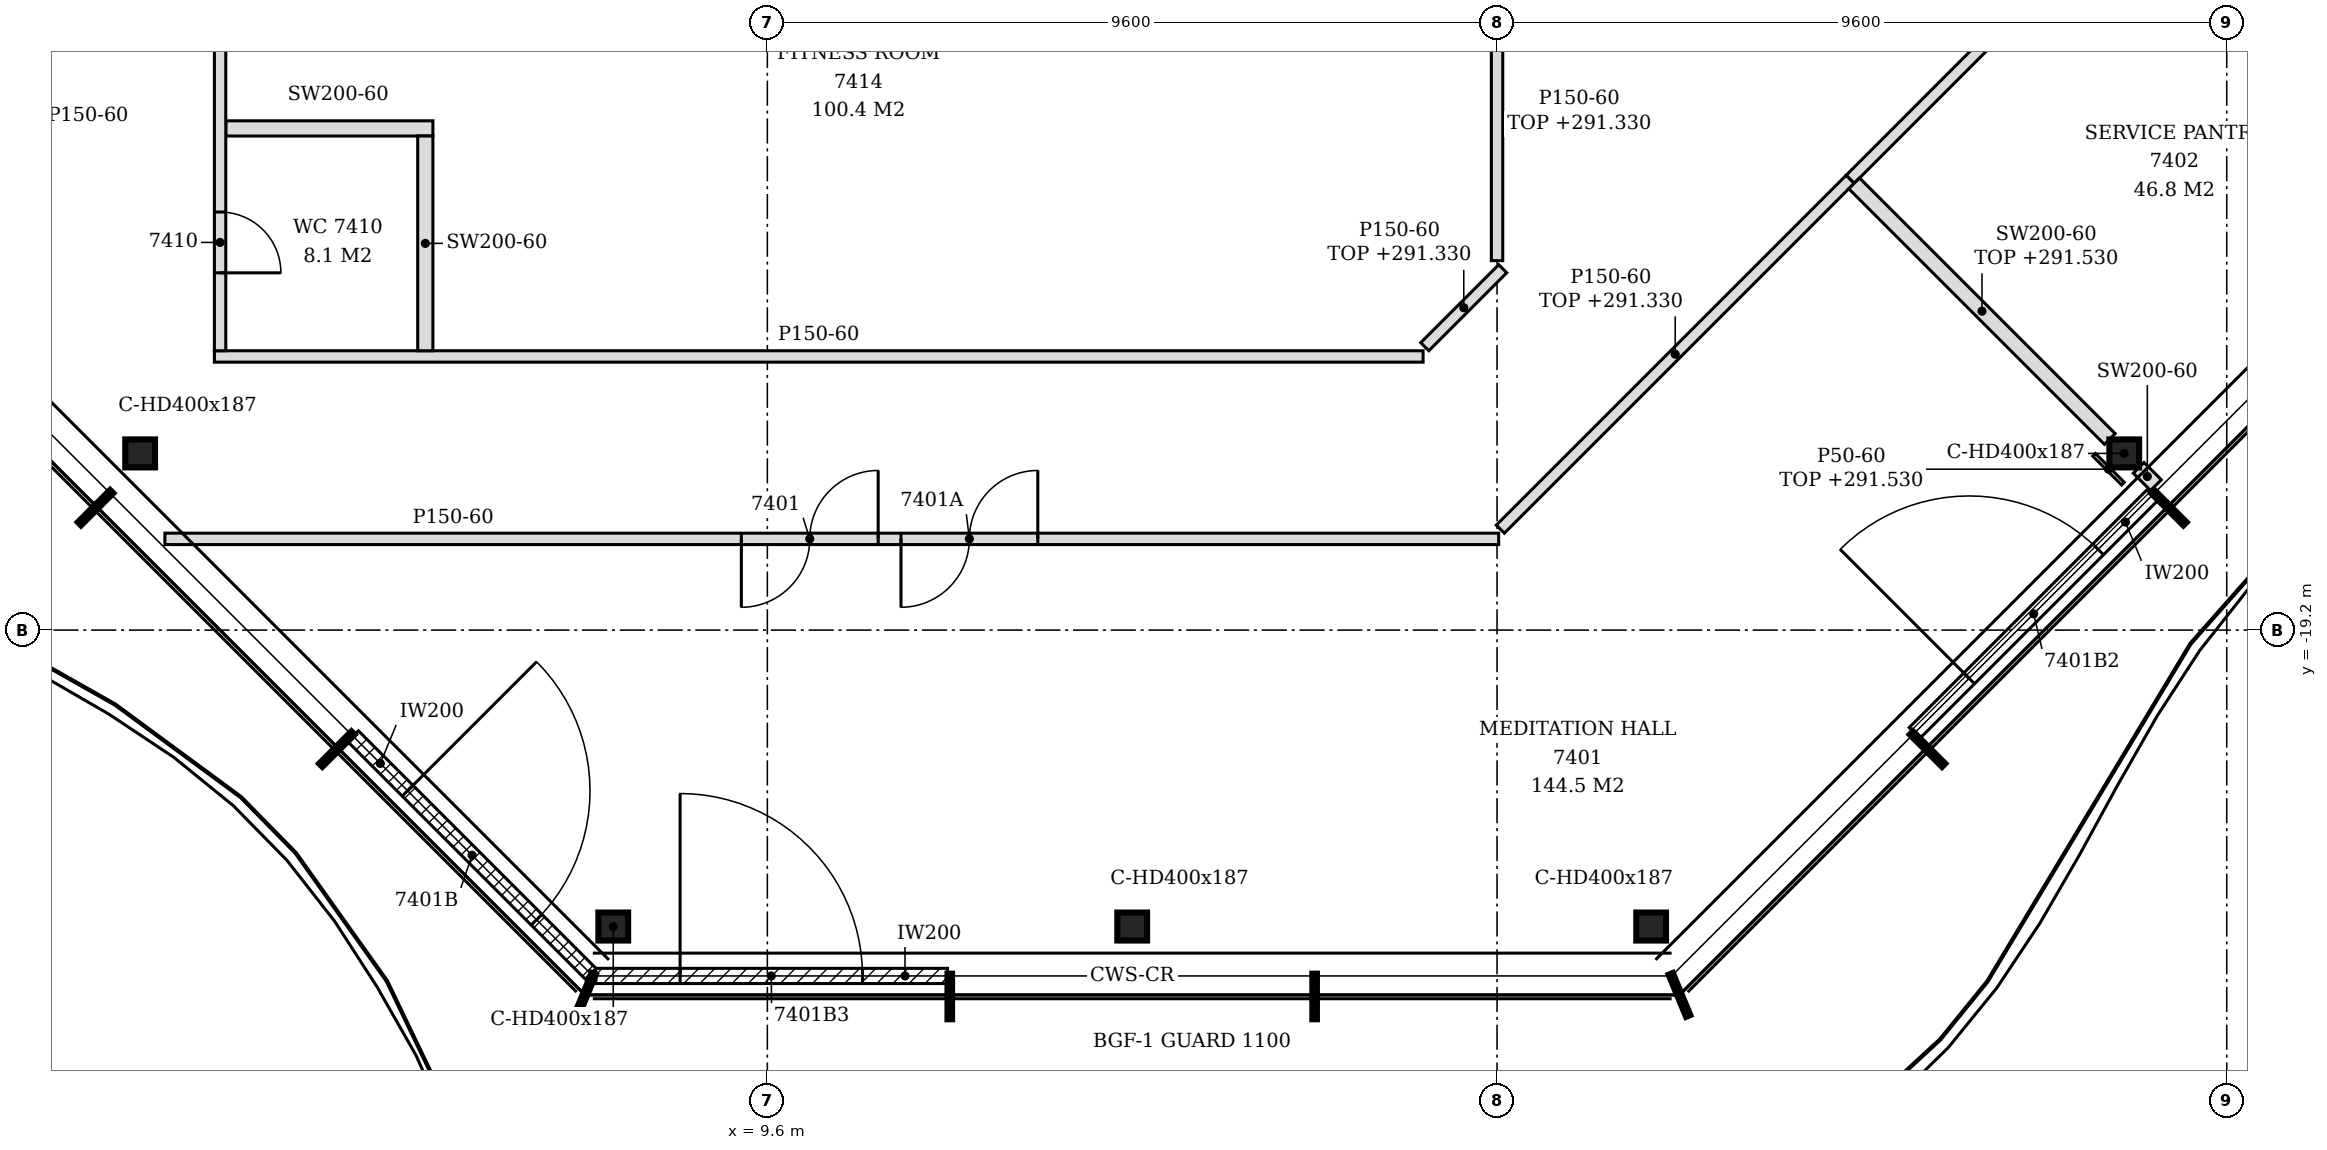
"""IFC4 building model, lengths in metres.
Left out: names, types, materials, properties, quantities, classifications, styles, units other than length and angle.
Written with IfcOpenShell. Run it as: python <this file> out.ifc"""

import sys

from ifc_helpers import new_model, si_unit, direction, frame, frame_2d, origin, origin_2d, place, context, subcontext, project, spatial, polyline, rectangle, i_section, outline, extrude, element, fill, save


model = new_model("IFC4")
c1 = context("Model", 3, precision=1e-05, world=origin(), true_north=direction((0.0, 1.0)))
c2 = subcontext(c1, "Body", "Model", "MODEL_VIEW")
j1 = project(units=[si_unit("LENGTHUNIT", "METRE"), si_unit("PLANEANGLEUNIT", "RADIAN")], contexts=[c1])
p1 = place(None, origin())
s1 = spatial("IfcSite", under=j1, at=p1, CompositionType="ELEMENT")
p2 = place(p1, origin())
s2 = spatial("IfcBuilding", under=s1, at=p2, CompositionType="ELEMENT")
p3 = place(p2, frame((0.0, 0.0, 288.6)))
s3 = spatial("IfcBuildingStorey", under=s2, at=p3, CompositionType="ELEMENT", Elevation=288.6)
for number, where, z_axis, x_axis in (
    (1, (7.573, -23.1, -0.15), (0.0, 0.0, 1.0), (1.0, 0.0, 0.0)),
    (2, (14.4, -23.1, -0.15), (0.0, 0.0, 1.0), (1.0, 0.0, 0.0)),
    (3, (21.227, -23.1, -0.15), (0.0, 0.0, 1.0), (1.0, 0.0, 0.0)),
    (4, (27.451, -16.876, -0.15), (0.0, 0.0, 1.0), (1.0, 0.0, 0.0)),
    (5, (1.348, -16.876, -0.15), (0.0, 0.0, 1.0), (1.0, 0.0, 0.0)),
):
    element("IfcColumn", number, at=place(p3, frame(where, z_axis=z_axis, x_axis=x_axis)), inside=s3, PredefinedType="COLUMN", context=c2, shape_type="SweptSolid", body=[
        extrude(i_section(OverallWidth=0.391, OverallDepth=0.368, WebThickness=0.015, FlangeThickness=0.024, FilletRadius=0.015, at=origin_2d()), origin(), (0.0, 0.0, 1.0), 3.6),
    ])
p4 = place(p3, frame((7.344, -23.75, 0.0), z_axis=(0.0, 0.0, 1.0), x_axis=(1.0, 0.0, 0.0)))
e6 = element("IfcWall", 6, at=p4, inside=s3, PredefinedType="NOTDEFINED", context=c2, shape_type="SweptSolid", body=[
    extrude(rectangle(XDim=4.626, YDim=0.2, at=frame_2d((2.313, 0.0))), origin(), (0.0, 0.0, 1.0), 3.45),
])
p5 = place(p4, frame((1.108, 0.0, 0.0)))
e7 = element("IfcOpeningElement", 7, at=p5, cuts=e6, PredefinedType="OPENING", context=c2, shape_type="SweptSolid", body=[
    extrude(rectangle(XDim=2.4, YDim=2.4, at=frame_2d((1.2, 1.2))), frame((0.0, 0.11, 0.0), z_axis=(0.0, -1.0, 0.0), x_axis=(1.0, 0.0, 0.0)), (0.0, 0.0, 1.0), 0.22),
])
p6 = place(p3, frame((24.693, -20.553, 0.0), z_axis=(0.0, 0.0, 1.0), x_axis=(0.707079231393, 0.707134329907, 0.0)))
e8 = element("IfcWall", 8, at=p6, inside=s3, PredefinedType="NOTDEFINED", context=c2, shape_type="SweptSolid", body=[
    extrude(rectangle(XDim=4.431, YDim=0.2, at=frame_2d((2.215, 0.0))), origin(), (0.0, 0.0, 1.0), 3.45),
])
p7 = place(p6, frame((1.015, 0.0, 0.0)))
e9 = element("IfcOpeningElement", 9, at=p7, cuts=e8, PredefinedType="OPENING", context=c2, shape_type="SweptSolid", body=[
    extrude(rectangle(XDim=2.4, YDim=2.4, at=frame_2d((1.2, 1.2))), frame((0.0, 0.11, 0.0), z_axis=(0.0, -1.0, 0.0), x_axis=(1.0, 0.0, 0.0)), (0.0, 0.0, 1.0), 0.22),
])
p8 = place(p3, frame((4.149, -20.596, 0.0), z_axis=(0.0, 0.0, 1.0), x_axis=(0.707134392299, -0.707079168996, 0.0)))
e10 = element("IfcWall", 10, at=p8, inside=s3, PredefinedType="NOTDEFINED", context=c2, shape_type="SweptSolid", body=[
    extrude(rectangle(XDim=4.421, YDim=0.2, at=frame_2d((2.21, 0.0))), origin(), (0.0, 0.0, 1.0), 3.45),
])
p9 = place(p8, frame((1.015, 0.0, 0.0)))
e11 = element("IfcOpeningElement", 11, at=p9, cuts=e10, PredefinedType="OPENING", context=c2, shape_type="SweptSolid", body=[
    extrude(rectangle(XDim=2.4, YDim=2.4, at=frame_2d((1.2, 1.2))), frame((0.0, 0.11, 0.0), z_axis=(0.0, -1.0, 0.0), x_axis=(1.0, 0.0, 0.0)), (0.0, 0.0, 1.0), 0.22),
])
p10 = place(p3, frame((1.674, -18.0, 0.0), z_axis=(0.0, 0.0, 1.0), x_axis=(1.0, 0.0, 0.0)))
e12 = element("IfcWall", 12, at=p10, inside=s3, PredefinedType="PARTITIONING", context=c2, shape_type="SweptSolid", body=[
    extrude(outline(polyline([(0.0, 0.0), (17.547, 0.0), (17.547, 2.73), (17.376, 2.73), (17.374, 3.45), (5.676, 3.45), (5.674, 2.73), (5.376, 2.73), (5.374, 3.45), (1.086, 3.45), (1.084, 2.93), (0.512, 2.93), (0.51, 3.45), (0.0, 3.45), (0.0, 0.0)])), frame((0.0, 0.075, 0.0), z_axis=(0.0, -1.0, 0.0), x_axis=(1.0, 0.0, 0.0)), (0.0, 0.0, 1.0), 0.15),
])
p11 = place(p10, frame((7.584, 0.0, 0.0)))
e13 = element("IfcOpeningElement", 13, at=p11, cuts=e12, PredefinedType="OPENING", context=c2, shape_type="SweptSolid", body=[
    extrude(rectangle(XDim=1.8, YDim=2.1, at=frame_2d((0.9, 1.05))), frame((0.0, 0.085, 0.0), z_axis=(0.0, -1.0, 0.0), x_axis=(1.0, 0.0, 0.0)), (0.0, 0.0, 1.0), 0.17),
])
p12 = place(p10, frame((9.684, 0.0, 0.0)))
e14 = element("IfcOpeningElement", 14, at=p12, cuts=e12, PredefinedType="OPENING", context=c2, shape_type="SweptSolid", body=[
    extrude(rectangle(XDim=1.8, YDim=2.1, at=frame_2d((0.9, 1.05))), frame((0.0, 0.085, 0.0), z_axis=(0.0, -1.0, 0.0), x_axis=(1.0, 0.0, 0.0)), (0.0, 0.0, 1.0), 0.17),
])
p13 = place(p3, frame((19.243, -17.872, 0.0), z_axis=(0.0, 0.0, 1.0), x_axis=(0.707106781187, 0.707106781187, 0.0)))
e15 = element("IfcWall", 15, at=p13, inside=s3, PredefinedType="PARTITIONING", context=c2, shape_type="SweptSolid", body=[
    extrude(rectangle(XDim=6.508, YDim=0.15, at=frame_2d((3.254, 0.0))), origin(), (0.0, 0.0, 1.0), 2.73),
])
p14 = place(p3, frame((27.869, -17.293, 0.0), z_axis=(0.0, 0.0, 1.0), x_axis=(-0.70748623202, 0.706727126621, 0.0)))
e16 = element("IfcWall", 16, at=p14, inside=s3, PredefinedType="PARTITIONING", context=c2, shape_type="SweptSolid", body=[
    extrude(rectangle(XDim=0.322, YDim=0.2, at=frame_2d((0.161, 0.0))), origin(), (0.0, 0.0, 1.0), 3.45),
])
p15 = place(p3, frame((27.262, -16.686, 0.0), z_axis=(0.0, 0.0, 1.0), x_axis=(-0.707209431512, 0.707004115957, 0.0)))
e17 = element("IfcWall", 17, at=p15, inside=s3, PredefinedType="PARTITIONING", context=c2, shape_type="SweptSolid", body=[
    extrude(rectangle(XDim=4.756, YDim=0.2, at=frame_2d((2.378, 0.0))), origin(), (0.0, 0.0, 1.0), 2.93),
])
p16 = place(p3, frame((2.325, -15.6, 0.0), z_axis=(0.0, 0.0, 1.0), x_axis=(1.0, 0.0, 0.0)))
e18 = element("IfcWall", 18, at=p16, inside=s3, PredefinedType="PARTITIONING", context=c2, shape_type="SweptSolid", body=[
    extrude(outline(polyline([(0.0, 0.0), (15.902, 0.0), (15.902, 3.45), (5.025, 3.45), (5.023, 2.73), (4.725, 2.73), (4.723, 3.45), (0.0, 3.45), (0.0, 0.0)])), frame((0.0, 0.075, 0.0), z_axis=(0.0, -1.0, 0.0), x_axis=(1.0, 0.0, 0.0)), (0.0, 0.0, 1.0), 0.15),
])
p17 = place(p3, frame((2.4, -15.525, 0.0), z_axis=(0.0, 0.0, 1.0), x_axis=(0.0, 1.0, 0.0)))
e19 = element("IfcWall", 19, at=p17, inside=s3, PredefinedType="PARTITIONING", context=c2, shape_type="SweptSolid", body=[
    extrude(outline(polyline([(0.0, 0.0), (7.05, 0.0), (7.05, 2.83), (6.975, 2.83), (6.973, 3.45), (1.22, 3.45), (1.218, 2.98), (1.03, 2.98), (1.028, 3.45), (0.0, 3.45), (0.0, 0.0)])), frame((0.0, 0.075, 0.0), z_axis=(0.0, -1.0, 0.0), x_axis=(1.0, 0.0, 0.0)), (0.0, 0.0, 1.0), 0.15),
])
p18 = place(p17, frame((1.025, 0.0, 0.0)))
e20 = element("IfcOpeningElement", 20, at=p18, cuts=e19, PredefinedType="OPENING", context=c2, shape_type="SweptSolid", body=[
    extrude(rectangle(XDim=0.8, YDim=2.1, at=frame_2d((0.4, 1.05))), frame((0.0, 0.085, 0.0), z_axis=(0.0, -1.0, 0.0), x_axis=(1.0, 0.0, 0.0)), (0.0, 0.0, 1.0), 0.17),
])
p19 = place(p3, frame((5.1, -15.525, 0.0), z_axis=(0.0, 0.0, 1.0), x_axis=(0.0, 1.0, 0.0)))
e21 = element("IfcWall", 21, at=p19, inside=s3, PredefinedType="PARTITIONING", context=c2, shape_type="SweptSolid", body=[
    extrude(outline(polyline([(0.0, 0.0), (2.825, 0.0), (2.825, 3.45), (1.22, 3.45), (1.218, 2.98), (1.03, 2.98), (1.028, 3.45), (0.0, 3.45), (0.0, 0.0)])), frame((0.0, 0.1, 0.0), z_axis=(0.0, -1.0, 0.0), x_axis=(1.0, 0.0, 0.0)), (0.0, 0.0, 1.0), 0.2),
])
p20 = place(p3, frame((18.249, -15.472, 0.0), z_axis=(0.0, 0.0, 1.0), x_axis=(0.707106781187, 0.707106781187, 0.0)))
e22 = element("IfcWall", 22, at=p20, inside=s3, PredefinedType="PARTITIONING", context=c2, shape_type="SweptSolid", body=[
    extrude(rectangle(XDim=1.451, YDim=0.15, at=frame_2d((0.726, 0.0))), origin(), (0.0, 0.0, 1.0), 2.73),
])
p21 = place(p3, frame((19.2, -14.34, 0.0), z_axis=(0.0, 0.0, 1.0), x_axis=(0.0, 1.0, 0.0)))
e23 = element("IfcWall", 23, at=p21, inside=s3, PredefinedType="PARTITIONING", context=c2, shape_type="SweptSolid", body=[
    extrude(rectangle(XDim=3.925, YDim=0.15, at=frame_2d((1.962, 0.0))), origin(), (0.0, 0.0, 1.0), 2.73),
])
p22 = place(p3, frame((23.845, -13.27, 0.0), z_axis=(0.0, 0.0, 1.0), x_axis=(0.707044144392, 0.707169412433, 0.0)))
e24 = element("IfcWall", 24, at=p22, inside=s3, PredefinedType="PARTITIONING", context=c2, shape_type="SweptSolid", body=[
    extrude(rectangle(XDim=7.796, YDim=0.15, at=frame_2d((3.898, 0.0))), origin(), (0.0, 0.0, 1.0), 2.88),
])
p23 = place(p22, frame((3.448, 0.0, 0.0)))
e25 = element("IfcOpeningElement", 25, at=p23, cuts=e24, PredefinedType="OPENING", context=c2, shape_type="SweptSolid", body=[
    extrude(rectangle(XDim=0.9, YDim=2.1, at=frame_2d((0.45, 1.05))), frame((0.0, 0.085, 0.0), z_axis=(0.0, -1.0, 0.0), x_axis=(1.0, 0.0, 0.0)), (0.0, 0.0, 1.0), 0.17),
])
p24 = place(p3, frame((2.475, -12.6, 0.0), z_axis=(0.0, 0.0, 1.0), x_axis=(1.0, 0.0, 0.0)))
e26 = element("IfcWall", 26, at=p24, inside=s3, PredefinedType="PARTITIONING", context=c2, shape_type="SweptSolid", body=[
    extrude(rectangle(XDim=2.725, YDim=0.2, at=frame_2d((1.362, 0.0))), origin(), (0.0, 0.0, 1.0), 3.45),
])
p25 = place(p3, frame((27.434, -17.273, 0.0), z_axis=(0.0, 0.0, 1.0), x_axis=(-0.707106781187, 0.707106781187, 0.0)))
e27 = element("IfcWall", 27, at=p25, inside=s3, PredefinedType="PARTITIONING", context=c2, shape_type="SweptSolid", body=[
    extrude(rectangle(XDim=0.537, YDim=0.05, at=frame_2d((0.269, 0.0))), origin(), (0.0, 0.0, 1.0), 2.93),
])
p26 = place(p5, origin())
e28 = element("IfcDoor", 28, at=p26, inside=s3, OperationType="SINGLE_SWING_LEFT", PredefinedType="DOOR", context=c2, shape_type="SweptSolid", body=[
    extrude(rectangle(XDim=2.4, YDim=2.4, at=frame_2d((1.2, 1.2))), frame((0.0, 0.025, 0.0), z_axis=(0.0, -1.0, 0.0), x_axis=(1.0, 0.0, 0.0)), (0.0, 0.0, 1.0), 0.05),
])
fill(e7, e28)
p27 = place(p7, origin())
e29 = element("IfcDoor", 29, at=p27, inside=s3, OperationType="SINGLE_SWING_LEFT", PredefinedType="DOOR", context=c2, shape_type="SweptSolid", body=[
    extrude(rectangle(XDim=2.4, YDim=2.4, at=frame_2d((1.2, 1.2))), frame((0.0, 0.025, 0.0), z_axis=(0.0, -1.0, 0.0), x_axis=(1.0, 0.0, 0.0)), (0.0, 0.0, 1.0), 0.05),
])
fill(e9, e29)
p28 = place(p9, origin())
e30 = element("IfcDoor", 30, at=p28, inside=s3, OperationType="SINGLE_SWING_LEFT", PredefinedType="DOOR", context=c2, shape_type="SweptSolid", body=[
    extrude(rectangle(XDim=2.4, YDim=2.4, at=frame_2d((1.2, 1.2))), frame((0.0, 0.025, 0.0), z_axis=(0.0, -1.0, 0.0), x_axis=(1.0, 0.0, 0.0)), (0.0, 0.0, 1.0), 0.05),
])
fill(e11, e30)
p29 = place(p11, frame((1.8, 0.0, 0.0), z_axis=(0.0, 0.0, 1.0), x_axis=(-1.0, 0.0, 0.0)))
e31 = element("IfcDoor", 31, at=p29, inside=s3, OperationType="DOUBLE_DOOR_SINGLE_SWING", PredefinedType="DOOR", context=c2, shape_type="SweptSolid", body=[
    extrude(rectangle(XDim=1.8, YDim=2.1, at=frame_2d((0.9, 1.05))), frame((0.0, 0.025, 0.0), z_axis=(0.0, -1.0, 0.0), x_axis=(1.0, 0.0, 0.0)), (0.0, 0.0, 1.0), 0.05),
])
fill(e13, e31)
p30 = place(p12, frame((1.8, 0.0, 0.0), z_axis=(0.0, 0.0, 1.0), x_axis=(-1.0, 0.0, 0.0)))
e32 = element("IfcDoor", 32, at=p30, inside=s3, OperationType="DOUBLE_DOOR_SINGLE_SWING", PredefinedType="DOOR", context=c2, shape_type="SweptSolid", body=[
    extrude(rectangle(XDim=1.8, YDim=2.1, at=frame_2d((0.9, 1.05))), frame((0.0, 0.025, 0.0), z_axis=(0.0, -1.0, 0.0), x_axis=(1.0, 0.0, 0.0)), (0.0, 0.0, 1.0), 0.05),
])
fill(e14, e32)
p31 = place(p18, frame((0.8, 0.0, 0.0), z_axis=(0.0, 0.0, 1.0), x_axis=(-1.0, 0.0, 0.0)))
e33 = element("IfcDoor", 33, at=p31, inside=s3, OperationType="SINGLE_SWING_RIGHT", PredefinedType="DOOR", context=c2, shape_type="SweptSolid", body=[
    extrude(rectangle(XDim=0.8, YDim=2.1, at=frame_2d((0.4, 1.05))), frame((0.0, 0.025, 0.0), z_axis=(0.0, -1.0, 0.0), x_axis=(1.0, 0.0, 0.0)), (0.0, 0.0, 1.0), 0.05),
])
fill(e20, e33)
save(model, sys.argv[1])
